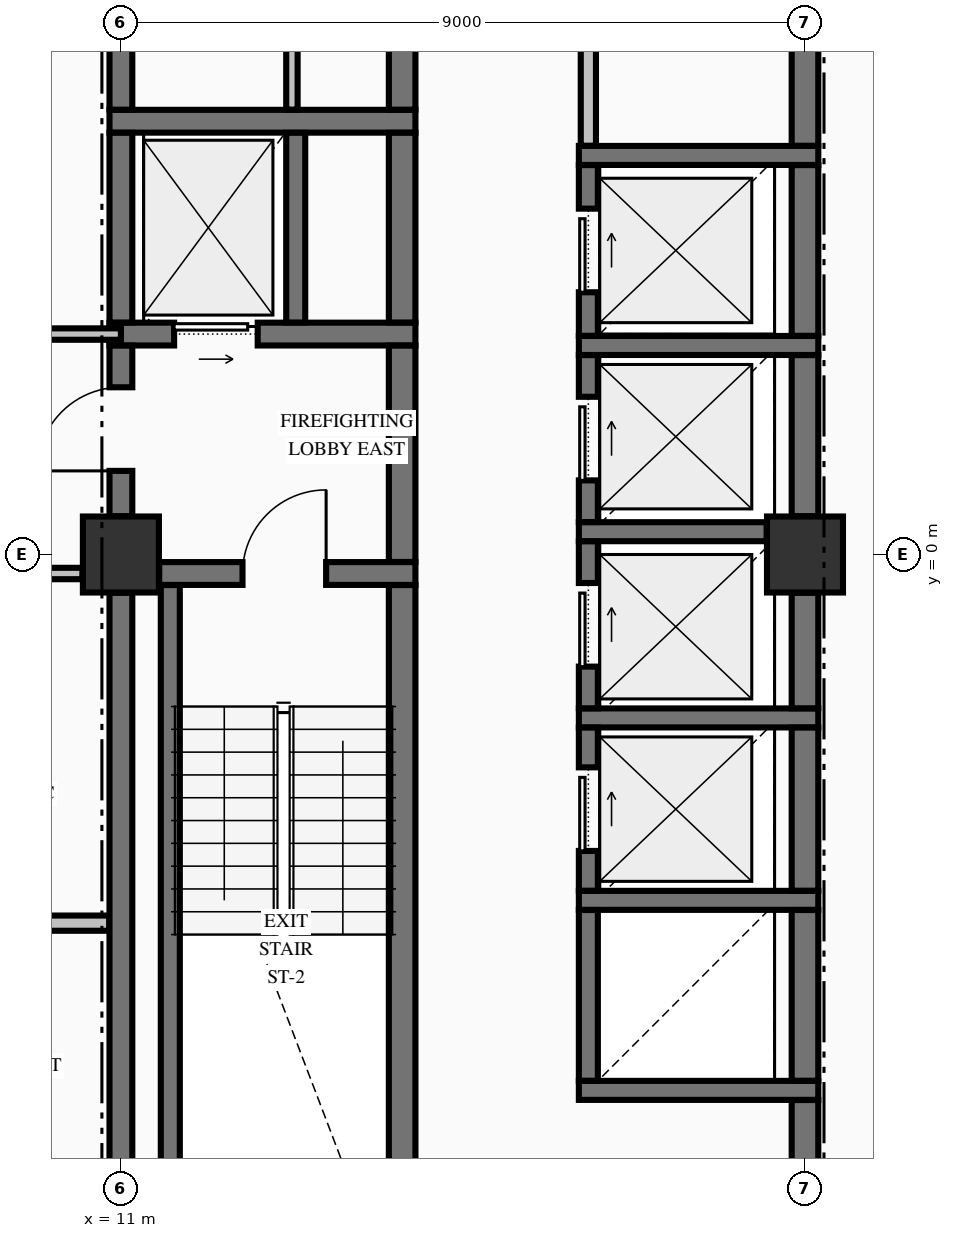
"""IFC4 building model, lengths in metres.
Left out: names, types, materials, properties, quantities, classifications, styles, units other than length and angle.
Written with IfcOpenShell. Run it as: python <this file> out.ifc"""

import sys

from ifc_helpers import new_model, si_unit, direction, frame, frame_2d, origin, origin_2d, place, context, subcontext, project, spatial, rectangle, extrude, element, fill, save


model = new_model("IFC4")
c1 = context("Model", 3, precision=1e-05, world=origin(), true_north=direction((0.0, 1.0)))
c2 = subcontext(c1, "Body", "Model", "MODEL_VIEW")
j1 = project(units=[si_unit("LENGTHUNIT", "METRE"), si_unit("PLANEANGLEUNIT", "RADIAN")], contexts=[c1])
p1 = place(None, origin())
s1 = spatial("IfcSite", under=j1, at=p1, CompositionType="ELEMENT")
p2 = place(p1, origin())
s2 = spatial("IfcBuilding", under=s1, at=p2, CompositionType="ELEMENT")
p3 = place(p2, frame((0.0, 0.0, 112.78)))
s3 = spatial("IfcBuildingStorey", under=s2, at=p3, CompositionType="ELEMENT", Elevation=112.78)
for number, where, z_axis, x_axis in (
    (1, (11.0, 0.0, -0.25), (0.0, 0.0, 1.0), (1.0, 0.0, 0.0)),
    (2, (20.0, 0.0, -0.25), (0.0, 0.0, 1.0), (1.0, 0.0, 0.0)),
):
    element("IfcColumn", number, at=place(p3, frame(where, z_axis=z_axis, x_axis=x_axis)), inside=s3, PredefinedType="COLUMN", context=c2, shape_type="SweptSolid", body=[
        extrude(rectangle(XDim=1.0, YDim=1.0, at=origin_2d()), origin(), (0.0, 0.0, 1.0), 3.395),
    ])
for number, where, z_axis, x_axis in (
    (3, (17.025, -7.05, 0.0), (0.0, 0.0, 1.0), (1.0, 0.0, 0.0)),
    (4, (17.025, -4.55, 0.0), (0.0, 0.0, 1.0), (1.0, 0.0, 0.0)),
    (5, (17.025, -2.15, 0.0), (0.0, 0.0, 1.0), (1.0, 0.0, 0.0)),
):
    element("IfcWall", number, at=place(p3, frame(where, z_axis=z_axis, x_axis=x_axis)), inside=s3, PredefinedType="SOLIDWALL", context=c2, shape_type="SweptSolid", body=[
        extrude(rectangle(XDim=3.15, YDim=0.25, at=frame_2d((1.575, 0.0))), origin(), (0.0, 0.0, 1.0), 3.145),
    ])
p4 = place(p3, frame((11.504, -0.25, 0.0), z_axis=(0.0, 0.0, 1.0), x_axis=(1.0, 0.0, 0.0)))
e6 = element("IfcWall", 6, at=p4, inside=s3, PredefinedType="SHEAR", context=c2, shape_type="SweptSolid", body=[
    extrude(rectangle(XDim=3.371, YDim=0.3, at=frame_2d((1.686, 0.0))), origin(), (0.0, 0.0, 1.0), 3.145),
])
p5 = place(p4, frame((1.096, 0.0, 0.0)))
e7 = element("IfcOpeningElement", 7, at=p5, cuts=e6, PredefinedType="OPENING", context=c2, shape_type="SweptSolid", body=[
    extrude(rectangle(XDim=1.1, YDim=2.15, at=frame_2d((0.55, 1.075))), frame((0.0, 0.16, 0.0), z_axis=(0.0, -1.0, 0.0), x_axis=(1.0, 0.0, 0.0)), (0.0, 0.0, 1.0), 0.32),
])
p6 = place(p3, frame((17.025, 0.3, 0.0), z_axis=(0.0, 0.0, 1.0), x_axis=(1.0, 0.0, 0.0)))
e8 = element("IfcWall", 8, at=p6, inside=s3, PredefinedType="SOLIDWALL", context=c2, shape_type="SweptSolid", body=[
    extrude(rectangle(XDim=2.471, YDim=0.25, at=frame_2d((1.236, 0.0))), origin(), (0.0, 0.0, 1.0), 3.145),
])
p7 = place(p3, frame((17.025, 2.75, 0.0), z_axis=(0.0, 0.0, 1.0), x_axis=(1.0, 0.0, 0.0)))
e9 = element("IfcWall", 9, at=p7, inside=s3, PredefinedType="SOLIDWALL", context=c2, shape_type="SweptSolid", body=[
    extrude(rectangle(XDim=3.15, YDim=0.25, at=frame_2d((1.575, 0.0))), origin(), (0.0, 0.0, 1.0), 3.145),
])
p8 = place(p3, frame((10.85, 2.9, 0.0), z_axis=(0.0, 0.0, 1.0), x_axis=(1.0, 0.0, 0.0)))
e10 = element("IfcWall", 10, at=p8, inside=s3, PredefinedType="SHEAR", context=c2, shape_type="SweptSolid", body=[
    extrude(rectangle(XDim=4.025, YDim=0.3, at=frame_2d((2.012, 0.0))), origin(), (0.0, 0.0, 1.0), 3.145),
])
p9 = place(p8, frame((0.85, 0.0, 0.0)))
e11 = element("IfcOpeningElement", 11, at=p9, cuts=e10, PredefinedType="OPENING", context=c2, shape_type="SweptSolid", body=[
    extrude(rectangle(XDim=1.1, YDim=2.2, at=frame_2d((0.55, 1.1))), frame((0.0, 0.16, 0.0), z_axis=(0.0, -1.0, 0.0), x_axis=(1.0, 0.0, 0.0)), (0.0, 0.0, 1.0), 0.32),
])
p10 = place(p3, frame((17.025, 5.25, 0.0), z_axis=(0.0, 0.0, 1.0), x_axis=(1.0, 0.0, 0.0)))
e12 = element("IfcWall", 12, at=p10, inside=s3, PredefinedType="SOLIDWALL", context=c2, shape_type="SweptSolid", body=[
    extrude(rectangle(XDim=3.15, YDim=0.25, at=frame_2d((1.575, 0.0))), origin(), (0.0, 0.0, 1.0), 3.145),
])
p11 = place(p3, frame((10.85, 5.7, 0.0), z_axis=(0.0, 0.0, 1.0), x_axis=(1.0, 0.0, 0.0)))
e13 = element("IfcWall", 13, at=p11, inside=s3, PredefinedType="SHEAR", context=c2, shape_type="SweptSolid", body=[
    extrude(rectangle(XDim=4.025, YDim=0.3, at=frame_2d((2.012, 0.0))), origin(), (0.0, 0.0, 1.0), 3.145),
])
p12 = place(p3, frame((5.075, -4.85, 0.0), z_axis=(0.0, 0.0, 1.0), x_axis=(1.0, 0.0, 0.0)))
e14 = element("IfcWall", 14, at=p12, inside=s3, PredefinedType="PARTITIONING", context=c2, shape_type="SweptSolid", body=[
    extrude(rectangle(XDim=5.772, YDim=0.2, at=frame_2d((2.886, 0.0))), origin(), (0.0, 0.0, 1.0), 3.145),
])
p13 = place(p3, frame((-10.494, -0.25, 0.0), z_axis=(0.0, 0.0, 1.0), x_axis=(1.0, 0.0, 0.0)))
e15 = element("IfcWall", 15, at=p13, inside=s3, PredefinedType="PARTITIONING", context=c2, shape_type="SweptSolid", body=[
    extrude(rectangle(XDim=20.988, YDim=0.15, at=frame_2d((10.494, 0.0))), origin(), (0.0, 0.0, 1.0), 3.145),
])
p14 = place(p13, frame((13.994, 0.0, 0.0)))
e16 = element("IfcOpeningElement", 16, at=p14, cuts=e15, PredefinedType="OPENING", context=c2, shape_type="SweptSolid", body=[
    extrude(rectangle(XDim=1.1, YDim=2.15, at=frame_2d((0.55, 1.075))), frame((0.0, 0.085, 0.0), z_axis=(0.0, -1.0, 0.0), x_axis=(1.0, 0.0, 0.0)), (0.0, 0.0, 1.0), 0.17),
])
p15 = place(p13, frame((5.939, 0.0, 0.0)))
e17 = element("IfcOpeningElement", 17, at=p15, cuts=e15, PredefinedType="OPENING", context=c2, shape_type="SweptSolid", body=[
    extrude(rectangle(XDim=1.05, YDim=2.15, at=frame_2d((0.525, 1.075))), frame((0.0, 0.085, 0.0), z_axis=(0.0, -1.0, 0.0), x_axis=(1.0, 0.0, 0.0)), (0.0, 0.0, 1.0), 0.17),
])
p16 = place(p13, frame((18.089, 0.0, 0.0)))
e18 = element("IfcOpeningElement", 18, at=p16, cuts=e15, PredefinedType="OPENING", context=c2, shape_type="SweptSolid", body=[
    extrude(rectangle(XDim=0.95, YDim=2.15, at=frame_2d((0.475, 1.075))), frame((0.0, 0.085, 0.0), z_axis=(0.0, -1.0, 0.0), x_axis=(1.0, 0.0, 0.0)), (0.0, 0.0, 1.0), 0.17),
])
p17 = place(p3, frame((-11.0, 2.9, 0.0), z_axis=(0.0, 0.0, 1.0), x_axis=(1.0, 0.0, 0.0)))
e19 = element("IfcWall", 19, at=p17, inside=s3, PredefinedType="PARTITIONING", context=c2, shape_type="SweptSolid", body=[
    extrude(rectangle(XDim=22.0, YDim=0.15, at=frame_2d((11.0, 0.0))), origin(), (0.0, 0.0, 1.0), 3.145),
])
p18 = place(p17, frame((14.5, 0.0, 0.0)))
e20 = element("IfcOpeningElement", 20, at=p18, cuts=e19, PredefinedType="OPENING", context=c2, shape_type="SweptSolid", body=[
    extrude(rectangle(XDim=1.1, YDim=2.15, at=frame_2d((0.55, 1.075))), frame((0.0, 0.085, 0.0), z_axis=(0.0, -1.0, 0.0), x_axis=(1.0, 0.0, 0.0)), (0.0, 0.0, 1.0), 0.17),
])
p19 = place(p17, frame((6.445, 0.0, 0.0)))
e21 = element("IfcOpeningElement", 21, at=p19, cuts=e19, PredefinedType="OPENING", context=c2, shape_type="SweptSolid", body=[
    extrude(rectangle(XDim=1.05, YDim=2.15, at=frame_2d((0.525, 1.075))), frame((0.0, 0.085, 0.0), z_axis=(0.0, -1.0, 0.0), x_axis=(1.0, 0.0, 0.0)), (0.0, 0.0, 1.0), 0.17),
])
p20 = place(p17, frame((18.52, 0.0, 0.0)))
e22 = element("IfcOpeningElement", 22, at=p20, cuts=e19, PredefinedType="OPENING", context=c2, shape_type="SweptSolid", body=[
    extrude(rectangle(XDim=1.1, YDim=2.15, at=frame_2d((0.55, 1.075))), frame((0.0, 0.085, 0.0), z_axis=(0.0, -1.0, 0.0), x_axis=(1.0, 0.0, 0.0)), (0.0, 0.0, 1.0), 0.17),
])
p21 = place(p3, frame((11.0, -9.446, 0.0), z_axis=(0.0, 0.0, 1.0), x_axis=(0.0, 1.0, 0.0)))
e23 = element("IfcWall", 23, at=p21, inside=s3, PredefinedType="SHEAR", context=c2, shape_type="SweptSolid", body=[
    extrude(rectangle(XDim=8.942, YDim=0.3, at=frame_2d((4.471, 0.0))), origin(), (0.0, 0.0, 1.0), 3.145),
])
p22 = place(p3, frame((11.0, 0.504, 0.0), z_axis=(0.0, 0.0, 1.0), x_axis=(0.0, 1.0, 0.0)))
e24 = element("IfcWall", 24, at=p22, inside=s3, PredefinedType="SHEAR", context=c2, shape_type="SweptSolid", body=[
    extrude(rectangle(XDim=2.244, YDim=0.3, at=frame_2d((1.122, 0.0))), origin(), (0.0, 0.0, 1.0), 3.145),
])
p23 = place(p22, frame((0.596, 0.0, 0.0)))
e25 = element("IfcOpeningElement", 25, at=p23, cuts=e24, PredefinedType="OPENING", context=c2, shape_type="SweptSolid", body=[
    extrude(rectangle(XDim=1.1, YDim=2.15, at=frame_2d((0.55, 1.075))), frame((0.0, 0.16, 0.0), z_axis=(0.0, -1.0, 0.0), x_axis=(1.0, 0.0, 0.0)), (0.0, 0.0, 1.0), 0.32),
])
p24 = place(p3, frame((11.0, 3.052, 0.0), z_axis=(0.0, 0.0, 1.0), x_axis=(0.0, 1.0, 0.0)))
e26 = element("IfcWall", 26, at=p24, inside=s3, PredefinedType="SHEAR", context=c2, shape_type="SweptSolid", body=[
    extrude(rectangle(XDim=2.496, YDim=0.3, at=frame_2d((1.248, 0.0))), origin(), (0.0, 0.0, 1.0), 3.145),
])
p25 = place(p3, frame((11.0, 5.852, 0.0), z_axis=(0.0, 0.0, 1.0), x_axis=(0.0, 1.0, 0.0)))
e27 = element("IfcWall", 27, at=p25, inside=s3, PredefinedType="SHEAR", context=c2, shape_type="SweptSolid", body=[
    extrude(rectangle(XDim=4.144, YDim=0.3, at=frame_2d((2.072, 0.0))), origin(), (0.0, 0.0, 1.0), 3.145),
])
p26 = place(p3, frame((11.65, -9.798, 0.0), z_axis=(0.0, 0.0, 1.0), x_axis=(0.0, 1.0, 0.0)))
e28 = element("IfcWall", 28, at=p26, inside=s3, PredefinedType="SOLIDWALL", context=c2, shape_type="SweptSolid", body=[
    extrude(rectangle(XDim=9.396, YDim=0.25, at=frame_2d((4.698, 0.0))), origin(), (0.0, 0.0, 1.0), 3.145),
])
p27 = place(p3, frame((13.3, 3.052, 0.0), z_axis=(0.0, 0.0, 1.0), x_axis=(0.0, 1.0, 0.0)))
e29 = element("IfcWall", 29, at=p27, inside=s3, PredefinedType="SOLIDWALL", context=c2, shape_type="SweptSolid", body=[
    extrude(rectangle(XDim=2.496, YDim=0.25, at=frame_2d((1.248, 0.0))), origin(), (0.0, 0.0, 1.0), 3.145),
])
p28 = place(p3, frame((14.7, -9.773, 0.0), z_axis=(0.0, 0.0, 1.0), x_axis=(0.0, 1.0, 0.0)))
e30 = element("IfcWall", 30, at=p28, inside=s3, PredefinedType="SHEAR", context=c2, shape_type="SweptSolid", body=[
    extrude(rectangle(XDim=9.371, YDim=0.35, at=frame_2d((4.686, 0.0))), origin(), (0.0, 0.0, 1.0), 3.145),
])
p29 = place(p3, frame((14.7, -0.098, 0.0), z_axis=(0.0, 0.0, 1.0), x_axis=(0.0, 1.0, 0.0)))
e31 = element("IfcWall", 31, at=p29, inside=s3, PredefinedType="SHEAR", context=c2, shape_type="SweptSolid", body=[
    extrude(rectangle(XDim=2.846, YDim=0.35, at=frame_2d((1.423, 0.0))), origin(), (0.0, 0.0, 1.0), 3.145),
])
p30 = place(p3, frame((14.7, 3.052, 0.0), z_axis=(0.0, 0.0, 1.0), x_axis=(0.0, 1.0, 0.0)))
e32 = element("IfcWall", 32, at=p30, inside=s3, PredefinedType="SHEAR", context=c2, shape_type="SweptSolid", body=[
    extrude(rectangle(XDim=2.496, YDim=0.35, at=frame_2d((1.248, 0.0))), origin(), (0.0, 0.0, 1.0), 3.145),
])
p31 = place(p3, frame((14.7, 5.852, 0.0), z_axis=(0.0, 0.0, 1.0), x_axis=(0.0, 1.0, 0.0)))
e33 = element("IfcWall", 33, at=p31, inside=s3, PredefinedType="SHEAR", context=c2, shape_type="SweptSolid", body=[
    extrude(rectangle(XDim=4.471, YDim=0.35, at=frame_2d((2.235, 0.0))), origin(), (0.0, 0.0, 1.0), 3.145),
])
p32 = place(p3, frame((17.15, -6.923, 0.0), z_axis=(0.0, 0.0, 1.0), x_axis=(0.0, 1.0, 0.0)))
e34 = element("IfcWall", 34, at=p32, inside=s3, PredefinedType="SOLIDWALL", context=c2, shape_type="SweptSolid", body=[
    extrude(rectangle(XDim=2.246, YDim=0.25, at=frame_2d((1.123, 0.0))), origin(), (0.0, 0.0, 1.0), 3.145),
])
p33 = place(p3, frame((17.15, -4.423, 0.0), z_axis=(0.0, 0.0, 1.0), x_axis=(0.0, 1.0, 0.0)))
e35 = element("IfcWall", 35, at=p33, inside=s3, PredefinedType="SOLIDWALL", context=c2, shape_type="SweptSolid", body=[
    extrude(rectangle(XDim=2.146, YDim=0.25, at=frame_2d((1.073, 0.0))), origin(), (0.0, 0.0, 1.0), 3.145),
])
p34 = place(p33, frame((0.523, 0.0, 0.0)))
e36 = element("IfcOpeningElement", 36, at=p34, cuts=e35, PredefinedType="OPENING", context=c2, shape_type="SweptSolid", body=[
    extrude(rectangle(XDim=1.1, YDim=2.2, at=frame_2d((0.55, 1.1))), frame((0.0, 0.135, 0.0), z_axis=(0.0, -1.0, 0.0), x_axis=(1.0, 0.0, 0.0)), (0.0, 0.0, 1.0), 0.27),
])
p35 = place(p3, frame((17.15, -2.023, 0.0), z_axis=(0.0, 0.0, 1.0), x_axis=(0.0, 1.0, 0.0)))
e37 = element("IfcWall", 37, at=p35, inside=s3, PredefinedType="SOLIDWALL", context=c2, shape_type="SweptSolid", body=[
    extrude(rectangle(XDim=2.196, YDim=0.25, at=frame_2d((1.098, 0.0))), origin(), (0.0, 0.0, 1.0), 3.145),
])
p36 = place(p35, frame((0.548, 0.0, 0.0)))
e38 = element("IfcOpeningElement", 38, at=p36, cuts=e37, PredefinedType="OPENING", context=c2, shape_type="SweptSolid", body=[
    extrude(rectangle(XDim=1.1, YDim=2.2, at=frame_2d((0.55, 1.1))), frame((0.0, 0.135, 0.0), z_axis=(0.0, -1.0, 0.0), x_axis=(1.0, 0.0, 0.0)), (0.0, 0.0, 1.0), 0.27),
])
p37 = place(p3, frame((17.15, 0.427, 0.0), z_axis=(0.0, 0.0, 1.0), x_axis=(0.0, 1.0, 0.0)))
e39 = element("IfcWall", 39, at=p37, inside=s3, PredefinedType="SOLIDWALL", context=c2, shape_type="SweptSolid", body=[
    extrude(rectangle(XDim=2.196, YDim=0.25, at=frame_2d((1.098, 0.0))), origin(), (0.0, 0.0, 1.0), 3.145),
])
p38 = place(p37, frame((0.548, 0.0, 0.0)))
e40 = element("IfcOpeningElement", 40, at=p38, cuts=e39, PredefinedType="OPENING", context=c2, shape_type="SweptSolid", body=[
    extrude(rectangle(XDim=1.1, YDim=2.2, at=frame_2d((0.55, 1.1))), frame((0.0, 0.135, 0.0), z_axis=(0.0, -1.0, 0.0), x_axis=(1.0, 0.0, 0.0)), (0.0, 0.0, 1.0), 0.27),
])
p39 = place(p3, frame((17.15, 2.877, 0.0), z_axis=(0.0, 0.0, 1.0), x_axis=(0.0, 1.0, 0.0)))
e41 = element("IfcWall", 41, at=p39, inside=s3, PredefinedType="SOLIDWALL", context=c2, shape_type="SweptSolid", body=[
    extrude(rectangle(XDim=2.246, YDim=0.25, at=frame_2d((1.123, 0.0))), origin(), (0.0, 0.0, 1.0), 3.145),
])
p40 = place(p39, frame((0.573, 0.0, 0.0)))
e42 = element("IfcOpeningElement", 42, at=p40, cuts=e41, PredefinedType="OPENING", context=c2, shape_type="SweptSolid", body=[
    extrude(rectangle(XDim=1.1, YDim=2.2, at=frame_2d((0.55, 1.1))), frame((0.0, 0.135, 0.0), z_axis=(0.0, -1.0, 0.0), x_axis=(1.0, 0.0, 0.0)), (0.0, 0.0, 1.0), 0.27),
])
p41 = place(p3, frame((20.0, -9.446, 0.0), z_axis=(0.0, 0.0, 1.0), x_axis=(0.0, 1.0, 0.0)))
e43 = element("IfcWall", 43, at=p41, inside=s3, PredefinedType="SHEAR", context=c2, shape_type="SweptSolid", body=[
    extrude(rectangle(XDim=2.269, YDim=0.35, at=frame_2d((1.135, 0.0))), origin(), (0.0, 0.0, 1.0), 3.145),
])
p42 = place(p3, frame((20.0, -6.923, 0.0), z_axis=(0.0, 0.0, 1.0), x_axis=(0.0, 1.0, 0.0)))
e44 = element("IfcWall", 44, at=p42, inside=s3, PredefinedType="SHEAR", context=c2, shape_type="SweptSolid", body=[
    extrude(rectangle(XDim=2.246, YDim=0.35, at=frame_2d((1.123, 0.0))), origin(), (0.0, 0.0, 1.0), 3.145),
])
p43 = place(p3, frame((20.0, -4.423, 0.0), z_axis=(0.0, 0.0, 1.0), x_axis=(0.0, 1.0, 0.0)))
e45 = element("IfcWall", 45, at=p43, inside=s3, PredefinedType="SHEAR", context=c2, shape_type="SweptSolid", body=[
    extrude(rectangle(XDim=2.146, YDim=0.35, at=frame_2d((1.073, 0.0))), origin(), (0.0, 0.0, 1.0), 3.145),
])
p44 = place(p3, frame((20.0, -2.023, 0.0), z_axis=(0.0, 0.0, 1.0), x_axis=(0.0, 1.0, 0.0)))
e46 = element("IfcWall", 46, at=p44, inside=s3, PredefinedType="SHEAR", context=c2, shape_type="SweptSolid", body=[
    extrude(rectangle(XDim=1.519, YDim=0.35, at=frame_2d((0.76, 0.0))), origin(), (0.0, 0.0, 1.0), 3.145),
])
p45 = place(p3, frame((20.0, 0.504, 0.0), z_axis=(0.0, 0.0, 1.0), x_axis=(0.0, 1.0, 0.0)))
e47 = element("IfcWall", 47, at=p45, inside=s3, PredefinedType="SHEAR", context=c2, shape_type="SweptSolid", body=[
    extrude(rectangle(XDim=2.119, YDim=0.35, at=frame_2d((1.06, 0.0))), origin(), (0.0, 0.0, 1.0), 3.145),
])
p46 = place(p3, frame((20.0, 2.877, 0.0), z_axis=(0.0, 0.0, 1.0), x_axis=(0.0, 1.0, 0.0)))
e48 = element("IfcWall", 48, at=p46, inside=s3, PredefinedType="SHEAR", context=c2, shape_type="SweptSolid", body=[
    extrude(rectangle(XDim=2.246, YDim=0.35, at=frame_2d((1.123, 0.0))), origin(), (0.0, 0.0, 1.0), 3.145),
])
p47 = place(p3, frame((20.0, 5.377, 0.0), z_axis=(0.0, 0.0, 1.0), x_axis=(0.0, 1.0, 0.0)))
e49 = element("IfcWall", 49, at=p47, inside=s3, PredefinedType="SHEAR", context=c2, shape_type="SweptSolid", body=[
    extrude(rectangle(XDim=4.619, YDim=0.35, at=frame_2d((2.31, 0.0))), origin(), (0.0, 0.0, 1.0), 3.145),
])
p48 = place(p3, frame((13.25, 5.853, 0.0), z_axis=(0.0, 0.0, 1.0), x_axis=(0.0, 1.0, 0.0)))
e50 = element("IfcWall", 50, at=p48, inside=s3, PredefinedType="PARTITIONING", context=c2, shape_type="SweptSolid", body=[
    extrude(rectangle(XDim=4.494, YDim=0.15, at=frame_2d((2.247, 0.0))), origin(), (0.0, 0.0, 1.0), 3.145),
])
p49 = place(p48, frame((1.472, 0.0, 0.0)))
e51 = element("IfcOpeningElement", 51, at=p49, cuts=e50, PredefinedType="OPENING", context=c2, shape_type="SweptSolid", body=[
    extrude(rectangle(XDim=0.95, YDim=2.15, at=frame_2d((0.475, 1.075))), frame((0.0, 0.085, 0.0), z_axis=(0.0, -1.0, 0.0), x_axis=(1.0, 0.0, 0.0)), (0.0, 0.0, 1.0), 0.17),
])
p50 = place(p3, frame((17.15, 5.378, 0.0), z_axis=(0.0, 0.0, 1.0), x_axis=(0.0, 1.0, 0.0)))
e52 = element("IfcWall", 52, at=p50, inside=s3, PredefinedType="PARTITIONING", context=c2, shape_type="SweptSolid", body=[
    extrude(rectangle(XDim=4.944, YDim=0.2, at=frame_2d((2.472, 0.0))), origin(), (0.0, 0.0, 1.0), 3.145),
])
p51 = place(p5, origin())
e53 = element("IfcDoor", 53, at=p51, inside=s3, OperationType="SINGLE_SWING_RIGHT", PredefinedType="DOOR", context=c2, shape_type="SweptSolid", body=[
    extrude(rectangle(XDim=1.1, YDim=2.15, at=frame_2d((0.55, 1.075))), frame((0.0, 0.025, 0.0), z_axis=(0.0, -1.0, 0.0), x_axis=(1.0, 0.0, 0.0)), (0.0, 0.0, 1.0), 0.05),
])
fill(e7, e53)
p52 = place(p23, origin())
e54 = element("IfcDoor", 54, at=p52, inside=s3, OperationType="SINGLE_SWING_LEFT", PredefinedType="DOOR", context=c2, shape_type="SweptSolid", body=[
    extrude(rectangle(XDim=1.1, YDim=2.15, at=frame_2d((0.55, 1.075))), frame((0.0, 0.025, 0.0), z_axis=(0.0, -1.0, 0.0), x_axis=(1.0, 0.0, 0.0)), (0.0, 0.0, 1.0), 0.05),
])
fill(e25, e54)
p53 = place(p9, origin())
e55 = element("IfcDoor", 55, at=p53, inside=s3, OperationType="SLIDING_TO_RIGHT", PredefinedType="DOOR", context=c2, shape_type="SweptSolid", body=[
    extrude(rectangle(XDim=1.1, YDim=2.2, at=frame_2d((0.55, 1.1))), frame((0.0, 0.025, 0.0), z_axis=(0.0, -1.0, 0.0), x_axis=(1.0, 0.0, 0.0)), (0.0, 0.0, 1.0), 0.05),
])
fill(e11, e55)
p54 = place(p34, origin())
e56 = element("IfcDoor", 56, at=p54, inside=s3, OperationType="SLIDING_TO_RIGHT", PredefinedType="DOOR", context=c2, shape_type="SweptSolid", body=[
    extrude(rectangle(XDim=1.1, YDim=2.2, at=frame_2d((0.55, 1.1))), frame((0.0, 0.025, 0.0), z_axis=(0.0, -1.0, 0.0), x_axis=(1.0, 0.0, 0.0)), (0.0, 0.0, 1.0), 0.05),
])
fill(e36, e56)
p55 = place(p36, origin())
e57 = element("IfcDoor", 57, at=p55, inside=s3, OperationType="SLIDING_TO_RIGHT", PredefinedType="DOOR", context=c2, shape_type="SweptSolid", body=[
    extrude(rectangle(XDim=1.1, YDim=2.2, at=frame_2d((0.55, 1.1))), frame((0.0, 0.025, 0.0), z_axis=(0.0, -1.0, 0.0), x_axis=(1.0, 0.0, 0.0)), (0.0, 0.0, 1.0), 0.05),
])
fill(e38, e57)
p56 = place(p38, origin())
e58 = element("IfcDoor", 58, at=p56, inside=s3, OperationType="SLIDING_TO_RIGHT", PredefinedType="DOOR", context=c2, shape_type="SweptSolid", body=[
    extrude(rectangle(XDim=1.1, YDim=2.2, at=frame_2d((0.55, 1.1))), frame((0.0, 0.025, 0.0), z_axis=(0.0, -1.0, 0.0), x_axis=(1.0, 0.0, 0.0)), (0.0, 0.0, 1.0), 0.05),
])
fill(e40, e58)
p57 = place(p40, origin())
e59 = element("IfcDoor", 59, at=p57, inside=s3, OperationType="SLIDING_TO_RIGHT", PredefinedType="DOOR", context=c2, shape_type="SweptSolid", body=[
    extrude(rectangle(XDim=1.1, YDim=2.2, at=frame_2d((0.55, 1.1))), frame((0.0, 0.025, 0.0), z_axis=(0.0, -1.0, 0.0), x_axis=(1.0, 0.0, 0.0)), (0.0, 0.0, 1.0), 0.05),
])
fill(e42, e59)
save(model, sys.argv[1])
